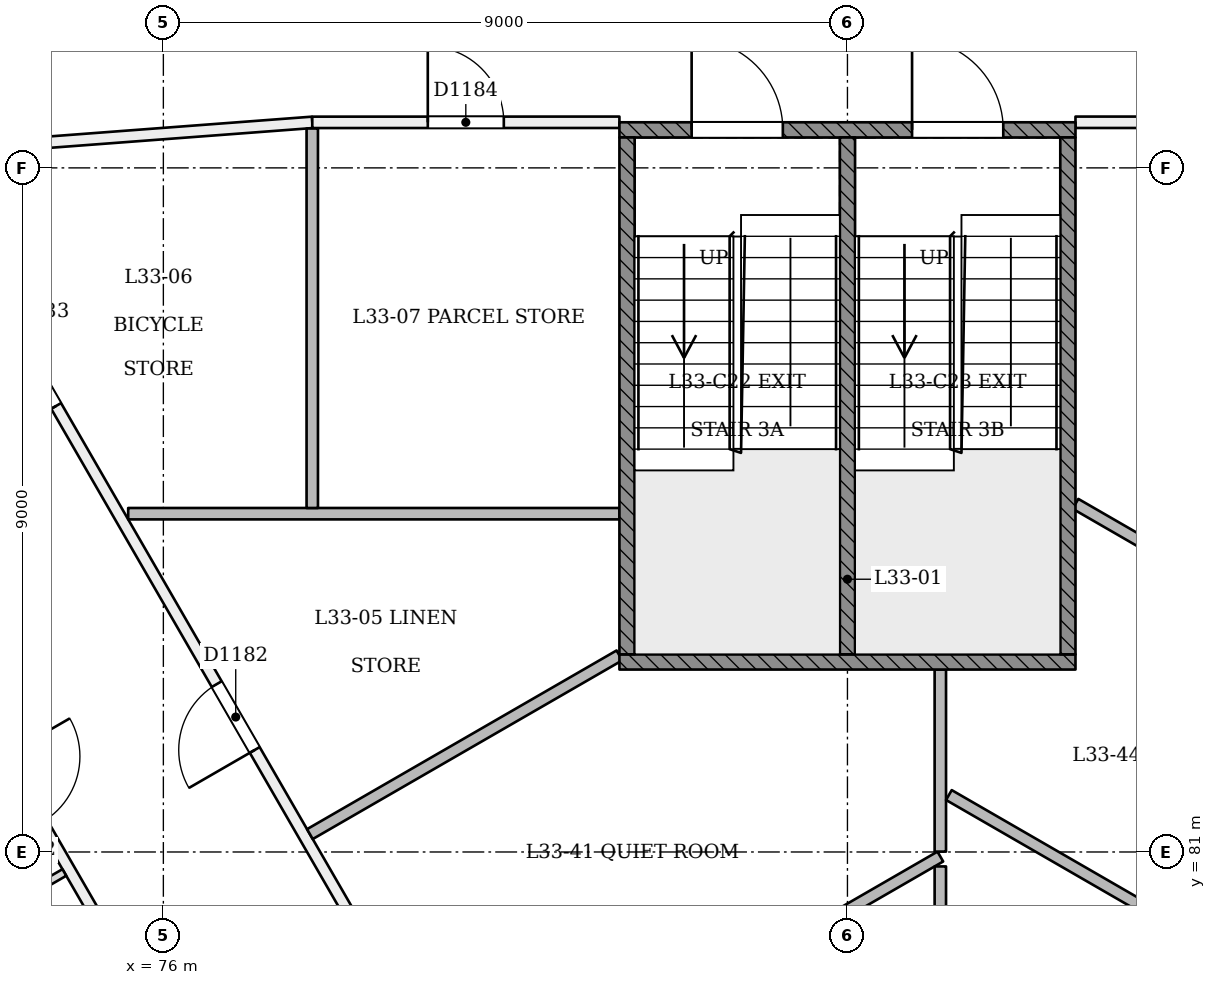
"""IFC4 building model, lengths in metres.
Left out: names, types, materials, properties, quantities, classifications, styles, units other than length and angle.
Written with IfcOpenShell. Run it as: python <this file> out.ifc"""

import sys

from ifc_helpers import new_model, si_unit, direction, frame, frame_2d, origin, place, context, subcontext, project, spatial, rectangle, extrude, element, fill, save


model = new_model("IFC4")
c1 = context("Model", 3, precision=1e-05, world=origin(), true_north=direction((0.0, 1.0)))
c2 = subcontext(c1, "Body", "Model", "MODEL_VIEW")
j1 = project(units=[si_unit("LENGTHUNIT", "METRE"), si_unit("PLANEANGLEUNIT", "RADIAN")], contexts=[c1])
p1 = place(None, origin())
s1 = spatial("IfcSite", under=j1, at=p1, CompositionType="ELEMENT")
p2 = place(p1, origin())
s2 = spatial("IfcBuilding", under=s1, at=p2, CompositionType="ELEMENT")
p3 = place(p2, frame((0.0, 0.0, 131.4)))
s3 = spatial("IfcBuildingStorey", under=s2, at=p3, CompositionType="ELEMENT", Elevation=131.4)
p4 = place(p3, frame((85.0, 68.836, 0.0), z_axis=(0.0, 0.0, 1.0), x_axis=(-0.500001726771, 0.86602440683, 0.0)))
e1 = element("IfcWall", 1, at=p4, inside=s3, PredefinedType="PARTITIONING", context=c2, shape_type="SweptSolid", body=[
    extrude(rectangle(XDim=24.669, YDim=0.15, at=frame_2d((12.335, 0.0))), origin(), (0.0, 0.0, 1.0), 3.15),
])
p5 = place(p4, frame((2.99, 0.0, 0.0)))
e2 = element("IfcOpeningElement", 2, at=p5, cuts=e1, PredefinedType="OPENING", context=c2, shape_type="SweptSolid", body=[
    extrude(rectangle(XDim=1.0, YDim=2.1, at=frame_2d((0.5, 1.05))), frame((0.0, 0.085, 0.0), z_axis=(0.0, -1.0, 0.0), x_axis=(1.0, 0.0, 0.0)), (0.0, 0.0, 1.0), 0.171),
])
p6 = place(p4, frame((15.596, 0.0, 0.0)))
e3 = element("IfcOpeningElement", 3, at=p6, cuts=e1, PredefinedType="OPENING", context=c2, shape_type="SweptSolid", body=[
    extrude(rectangle(XDim=1.0, YDim=2.1, at=frame_2d((0.5, 1.05))), frame((0.0, 0.085, 0.0), z_axis=(0.0, -1.0, 0.0), x_axis=(1.0, 0.0, 0.0)), (0.0, 0.0, 1.0), 0.171),
])
p7 = place(p4, frame((20.822, 0.0, 0.0)))
e4 = element("IfcOpeningElement", 4, at=p7, cuts=e1, PredefinedType="OPENING", context=c2, shape_type="SweptSolid", body=[
    extrude(rectangle(XDim=1.0, YDim=2.1, at=frame_2d((0.5, 1.05))), frame((0.0, 0.085, 0.0), z_axis=(0.0, -1.0, 0.0), x_axis=(1.0, 0.0, 0.0)), (0.0, 0.0, 1.0), 0.171),
])
p8 = place(p4, frame((11.43, 0.0, 0.0)))
e5 = element("IfcOpeningElement", 5, at=p8, cuts=e1, PredefinedType="OPENING", context=c2, shape_type="SweptSolid", body=[
    extrude(rectangle(XDim=1.0, YDim=2.1, at=frame_2d((0.5, 1.05))), frame((0.0, 0.085, 0.0), z_axis=(0.0, -1.0, 0.0), x_axis=(1.0, 0.0, 0.0)), (0.0, 0.0, 1.0), 0.171),
])
p9 = place(p4, frame((7.41, 0.0, 0.0)))
e6 = element("IfcOpeningElement", 6, at=p9, cuts=e1, PredefinedType="OPENING", context=c2, shape_type="SweptSolid", body=[
    extrude(rectangle(XDim=1.0, YDim=2.1, at=frame_2d((0.5, 1.05))), frame((0.0, 0.085, 0.0), z_axis=(0.0, -1.0, 0.0), x_axis=(1.0, 0.0, 0.0)), (0.0, 0.0, 1.0), 0.171),
])
p10 = place(p3, frame((72.784, 90.209, 0.0), z_axis=(0.0, 0.0, 1.0), x_axis=(0.997170112463, 0.075178233616, 0.0)))
e7 = element("IfcWall", 7, at=p10, inside=s3, PredefinedType="PARTITIONING", context=c2, shape_type="SweptSolid", body=[
    extrude(rectangle(XDim=5.189, YDim=0.15, at=frame_2d((2.595, 0.0))), origin(), (0.0, 0.0, 1.0), 3.15),
])
p11 = place(p3, frame((77.959, 90.599, 0.0), z_axis=(0.0, 0.0, 1.0), x_axis=(0.9999999708, 0.000241662632, 0.0)))
e8 = element("IfcWall", 8, at=p11, inside=s3, PredefinedType="PARTITIONING", context=c2, shape_type="SweptSolid", body=[
    extrude(rectangle(XDim=4.041, YDim=0.15, at=frame_2d((2.021, 0.0))), origin(), (0.0, 0.0, 1.0), 3.15),
])
p12 = place(p11, frame((1.52, 0.0, 0.0)))
e9 = element("IfcOpeningElement", 9, at=p12, cuts=e8, PredefinedType="OPENING", context=c2, shape_type="SweptSolid", body=[
    extrude(rectangle(XDim=1.0, YDim=2.1, at=frame_2d((0.5, 1.05))), frame((0.0, 0.085, 0.0), z_axis=(0.0, -1.0, 0.0), x_axis=(1.0, 0.0, 0.0)), (0.0, 0.0, 1.0), 0.171),
])
p13 = place(p3, frame((64.656, 98.273, 0.0), z_axis=(0.0, 0.0, 1.0), x_axis=(0.500001784794, -0.866024373331, 0.0)))
e10 = element("IfcWall", 10, at=p13, inside=s3, PredefinedType="PARTITIONING", context=c2, shape_type="SweptSolid", body=[
    extrude(rectangle(XDim=40.426, YDim=0.15, at=frame_2d((20.213, 0.0))), origin(), (0.0, 0.0, 1.0), 2.75),
])
p14 = place(p13, frame((0.2, 0.0, 0.0)))
e11 = element("IfcOpeningElement", 11, at=p14, cuts=e10, PredefinedType="OPENING", context=c2, shape_type="SweptSolid", body=[
    extrude(rectangle(XDim=1.2, YDim=2.1, at=frame_2d((0.6, 1.05))), frame((0.0, 0.085, 0.0), z_axis=(0.0, -1.0, 0.0), x_axis=(1.0, 0.0, 0.0)), (0.0, 0.0, 1.0), 0.171),
])
p15 = place(p13, frame((2.933, 0.0, 0.0)))
e12 = element("IfcOpeningElement", 12, at=p15, cuts=e10, PredefinedType="OPENING", context=c2, shape_type="SweptSolid", body=[
    extrude(rectangle(XDim=1.0, YDim=2.1, at=frame_2d((0.5, 1.05))), frame((0.0, 0.085, 0.0), z_axis=(0.0, -1.0, 0.0), x_axis=(1.0, 0.0, 0.0)), (0.0, 0.0, 1.0), 0.171),
])
p16 = place(p13, frame((9.608, 0.0, 0.0)))
e13 = element("IfcOpeningElement", 13, at=p16, cuts=e10, PredefinedType="OPENING", context=c2, shape_type="SweptSolid", body=[
    extrude(rectangle(XDim=1.0, YDim=2.1, at=frame_2d((0.5, 1.05))), frame((0.0, 0.085, 0.0), z_axis=(0.0, -1.0, 0.0), x_axis=(1.0, 0.0, 0.0)), (0.0, 0.0, 1.0), 0.171),
])
p17 = place(p13, frame((11.818, 0.0, 0.0)))
e14 = element("IfcOpeningElement", 14, at=p17, cuts=e10, PredefinedType="OPENING", context=c2, shape_type="SweptSolid", body=[
    extrude(rectangle(XDim=1.0, YDim=2.1, at=frame_2d((0.5, 1.05))), frame((0.0, 0.085, 0.0), z_axis=(0.0, -1.0, 0.0), x_axis=(1.0, 0.0, 0.0)), (0.0, 0.0, 1.0), 0.171),
])
p18 = place(p13, frame((18.493, 0.0, 0.0)))
e15 = element("IfcOpeningElement", 15, at=p18, cuts=e10, PredefinedType="OPENING", context=c2, shape_type="SweptSolid", body=[
    extrude(rectangle(XDim=1.0, YDim=2.1, at=frame_2d((0.5, 1.05))), frame((0.0, 0.085, 0.0), z_axis=(0.0, -1.0, 0.0), x_axis=(1.0, 0.0, 0.0)), (0.0, 0.0, 1.0), 0.171),
])
p19 = place(p13, frame((21.963, 0.0, 0.0)))
e16 = element("IfcOpeningElement", 16, at=p19, cuts=e10, PredefinedType="OPENING", context=c2, shape_type="SweptSolid", body=[
    extrude(rectangle(XDim=1.0, YDim=2.1, at=frame_2d((0.5, 1.05))), frame((0.0, 0.085, 0.0), z_axis=(0.0, -1.0, 0.0), x_axis=(1.0, 0.0, 0.0)), (0.0, 0.0, 1.0), 0.171),
])
p20 = place(p13, frame((27.493, 0.0, 0.0)))
e17 = element("IfcOpeningElement", 17, at=p20, cuts=e10, PredefinedType="OPENING", context=c2, shape_type="SweptSolid", body=[
    extrude(rectangle(XDim=1.0, YDim=2.1, at=frame_2d((0.5, 1.05))), frame((0.0, 0.085, 0.0), z_axis=(0.0, -1.0, 0.0), x_axis=(1.0, 0.0, 0.0)), (0.0, 0.0, 1.0), 0.171),
])
p21 = place(p13, frame((30.963, 0.0, 0.0)))
e18 = element("IfcOpeningElement", 18, at=p21, cuts=e10, PredefinedType="OPENING", context=c2, shape_type="SweptSolid", body=[
    extrude(rectangle(XDim=1.0, YDim=2.1, at=frame_2d((0.5, 1.05))), frame((0.0, 0.085, 0.0), z_axis=(0.0, -1.0, 0.0), x_axis=(1.0, 0.0, 0.0)), (0.0, 0.0, 1.0), 0.171),
])
p22 = place(p13, frame((36.493, 0.0, 0.0)))
e19 = element("IfcOpeningElement", 19, at=p22, cuts=e10, PredefinedType="OPENING", context=c2, shape_type="SweptSolid", body=[
    extrude(rectangle(XDim=1.0, YDim=2.1, at=frame_2d((0.5, 1.05))), frame((0.0, 0.085, 0.0), z_axis=(0.0, -1.0, 0.0), x_axis=(1.0, 0.0, 0.0)), (0.0, 0.0, 1.0), 0.171),
])
p23 = place(p13, frame((39.101, 0.0, 0.0)))
e20 = element("IfcOpeningElement", 20, at=p23, cuts=e10, PredefinedType="OPENING", context=c2, shape_type="SweptSolid", body=[
    extrude(rectangle(XDim=1.0, YDim=2.1, at=frame_2d((0.5, 1.05))), frame((0.0, 0.085, 0.0), z_axis=(0.0, -1.0, 0.0), x_axis=(1.0, 0.0, 0.0)), (0.0, 0.0, 1.0), 0.171),
])
p24 = place(p3, frame((85.131, 63.263, 0.0), z_axis=(0.0, 0.0, 1.0), x_axis=(0.500002881847, 0.866023739943, 0.0)))
e21 = element("IfcWall", 21, at=p24, inside=s3, PredefinedType="PARTITIONING", context=c2, shape_type="SweptSolid", body=[
    extrude(rectangle(XDim=34.013, YDim=0.15, at=frame_2d((17.006, 0.0))), origin(), (0.0, 0.0, 1.0), 2.75),
])
p25 = place(p24, frame((0.351, 0.0, 0.0)))
e22 = element("IfcOpeningElement", 22, at=p25, cuts=e21, PredefinedType="OPENING", context=c2, shape_type="SweptSolid", body=[
    extrude(rectangle(XDim=1.2, YDim=2.1, at=frame_2d((0.6, 1.05))), frame((0.0, 0.085, 0.0), z_axis=(0.0, -1.0, 0.0), x_axis=(1.0, 0.0, 0.0)), (0.0, 0.0, 1.0), 0.171),
])
p26 = place(p24, frame((3.963, 0.0, 0.0)))
e23 = element("IfcOpeningElement", 23, at=p26, cuts=e21, PredefinedType="OPENING", context=c2, shape_type="SweptSolid", body=[
    extrude(rectangle(XDim=1.0, YDim=2.1, at=frame_2d((0.5, 1.05))), frame((0.0, 0.085, 0.0), z_axis=(0.0, -1.0, 0.0), x_axis=(1.0, 0.0, 0.0)), (0.0, 0.0, 1.0), 0.171),
])
p27 = place(p24, frame((9.493, 0.0, 0.0)))
e24 = element("IfcOpeningElement", 24, at=p27, cuts=e21, PredefinedType="OPENING", context=c2, shape_type="SweptSolid", body=[
    extrude(rectangle(XDim=1.0, YDim=2.1, at=frame_2d((0.5, 1.05))), frame((0.0, 0.085, 0.0), z_axis=(0.0, -1.0, 0.0), x_axis=(1.0, 0.0, 0.0)), (0.0, 0.0, 1.0), 0.171),
])
p28 = place(p24, frame((11.818, 0.0, 0.0)))
e25 = element("IfcOpeningElement", 25, at=p28, cuts=e21, PredefinedType="OPENING", context=c2, shape_type="SweptSolid", body=[
    extrude(rectangle(XDim=1.0, YDim=2.1, at=frame_2d((0.5, 1.05))), frame((0.0, 0.085, 0.0), z_axis=(0.0, -1.0, 0.0), x_axis=(1.0, 0.0, 0.0)), (0.0, 0.0, 1.0), 0.171),
])
p29 = place(p24, frame((18.608, 0.0, 0.0)))
e26 = element("IfcOpeningElement", 26, at=p29, cuts=e21, PredefinedType="OPENING", context=c2, shape_type="SweptSolid", body=[
    extrude(rectangle(XDim=1.0, YDim=2.1, at=frame_2d((0.5, 1.05))), frame((0.0, 0.085, 0.0), z_axis=(0.0, -1.0, 0.0), x_axis=(1.0, 0.0, 0.0)), (0.0, 0.0, 1.0), 0.171),
])
p30 = place(p24, frame((20.933, 0.0, 0.0)))
e27 = element("IfcOpeningElement", 27, at=p30, cuts=e21, PredefinedType="OPENING", context=c2, shape_type="SweptSolid", body=[
    extrude(rectangle(XDim=1.0, YDim=2.1, at=frame_2d((0.5, 1.05))), frame((0.0, 0.085, 0.0), z_axis=(0.0, -1.0, 0.0), x_axis=(1.0, 0.0, 0.0)), (0.0, 0.0, 1.0), 0.171),
])
p31 = place(p24, frame((27.493, 0.0, 0.0)))
e28 = element("IfcOpeningElement", 28, at=p31, cuts=e21, PredefinedType="OPENING", context=c2, shape_type="SweptSolid", body=[
    extrude(rectangle(XDim=1.0, YDim=2.1, at=frame_2d((0.5, 1.05))), frame((0.0, 0.085, 0.0), z_axis=(0.0, -1.0, 0.0), x_axis=(1.0, 0.0, 0.0)), (0.0, 0.0, 1.0), 0.171),
])
p32 = place(p24, frame((29.933, 0.0, 0.0)))
e29 = element("IfcOpeningElement", 29, at=p32, cuts=e21, PredefinedType="OPENING", context=c2, shape_type="SweptSolid", body=[
    extrude(rectangle(XDim=1.0, YDim=2.1, at=frame_2d((0.5, 1.05))), frame((0.0, 0.085, 0.0), z_axis=(0.0, -1.0, 0.0), x_axis=(1.0, 0.0, 0.0)), (0.0, 0.0, 1.0), 0.171),
])
p33 = place(p3, frame((97.335, 90.2, 0.0), z_axis=(0.0, 0.0, 1.0), x_axis=(-0.500002918398, -0.86602371884, 0.0)))
e30 = element("IfcWall", 30, at=p33, inside=s3, PredefinedType="PARTITIONING", context=c2, shape_type="SweptSolid", body=[
    extrude(rectangle(XDim=24.539, YDim=0.15, at=frame_2d((12.27, 0.0))), origin(), (0.0, 0.0, 1.0), 3.15),
])
p34 = place(p33, frame((6.442, 0.0, 0.0)))
e31 = element("IfcOpeningElement", 31, at=p34, cuts=e30, PredefinedType="OPENING", context=c2, shape_type="SweptSolid", body=[
    extrude(rectangle(XDim=0.9, YDim=2.1, at=frame_2d((0.45, 1.05))), frame((0.0, 0.085, 0.0), z_axis=(0.0, -1.0, 0.0), x_axis=(1.0, 0.0, 0.0)), (0.0, 0.0, 1.0), 0.171),
])
p35 = place(p33, frame((2.46, 0.0, 0.0)))
e32 = element("IfcOpeningElement", 32, at=p35, cuts=e30, PredefinedType="OPENING", context=c2, shape_type="SweptSolid", body=[
    extrude(rectangle(XDim=0.9, YDim=2.1, at=frame_2d((0.45, 1.05))), frame((0.0, 0.085, 0.0), z_axis=(0.0, -1.0, 0.0), x_axis=(1.0, 0.0, 0.0)), (0.0, 0.0, 1.0), 0.171),
])
p36 = place(p33, frame((15.454, 0.0, 0.0)))
e33 = element("IfcOpeningElement", 33, at=p36, cuts=e30, PredefinedType="OPENING", context=c2, shape_type="SweptSolid", body=[
    extrude(rectangle(XDim=1.0, YDim=2.1, at=frame_2d((0.5, 1.05))), frame((0.0, 0.085, 0.0), z_axis=(0.0, -1.0, 0.0), x_axis=(1.0, 0.0, 0.0)), (0.0, 0.0, 1.0), 0.171),
])
p37 = place(p33, frame((10.281, 0.0, 0.0)))
e34 = element("IfcOpeningElement", 34, at=p37, cuts=e30, PredefinedType="OPENING", context=c2, shape_type="SweptSolid", body=[
    extrude(rectangle(XDim=1.0, YDim=2.1, at=frame_2d((0.5, 1.05))), frame((0.0, 0.085, 0.0), z_axis=(0.0, -1.0, 0.0), x_axis=(1.0, 0.0, 0.0)), (0.0, 0.0, 1.0), 0.171),
])
p38 = place(p3, frame((88.0, 90.6, 0.0), z_axis=(0.0, 0.0, 1.0), x_axis=(0.999999983836, -0.000179799521, 0.0)))
e35 = element("IfcWall", 35, at=p38, inside=s3, PredefinedType="PARTITIONING", context=c2, shape_type="SweptSolid", body=[
    extrude(rectangle(XDim=5.431, YDim=0.15, at=frame_2d((2.716, 0.0))), origin(), (0.0, 0.0, 1.0), 3.15),
])
p39 = place(p38, frame((1.603, 0.0, 0.0)))
e36 = element("IfcOpeningElement", 36, at=p39, cuts=e35, PredefinedType="OPENING", context=c2, shape_type="SweptSolid", body=[
    extrude(rectangle(XDim=1.0, YDim=2.1, at=frame_2d((0.5, 1.05))), frame((0.0, 0.085, 0.0), z_axis=(0.0, -1.0, 0.0), x_axis=(1.0, 0.0, 0.0)), (0.0, 0.0, 1.0), 0.171),
])
p40 = place(p3, frame((82.0, 85.451, 0.0), z_axis=(0.0, 0.0, 1.0), x_axis=(-1.0, 0.0, 0.0)))
e37 = element("IfcWall", 37, at=p40, inside=s3, PredefinedType="PARTITIONING", context=c2, shape_type="SweptSolid", body=[
    extrude(rectangle(XDim=6.463, YDim=0.15, at=frame_2d((3.231, 0.0))), origin(), (0.0, 0.0, 1.0), 3.15),
])
p41 = place(p3, frame((77.928, 81.235, 0.0), z_axis=(0.0, 0.0, 1.0), x_axis=(0.866029956157, 0.499992114976, 0.0)))
e38 = element("IfcWall", 38, at=p41, inside=s3, PredefinedType="PARTITIONING", context=c2, shape_type="SweptSolid", body=[
    extrude(rectangle(XDim=4.702, YDim=0.15, at=frame_2d((2.351, 0.0))), origin(), (0.0, 0.0, 1.0), 3.15),
])
p42 = place(p3, frame((77.959, 85.526, 0.0), z_axis=(0.0, 0.0, 1.0), x_axis=(0.0, 1.0, 0.0)))
e39 = element("IfcWall", 39, at=p42, inside=s3, PredefinedType="PARTITIONING", context=c2, shape_type="SweptSolid", body=[
    extrude(rectangle(XDim=4.992, YDim=0.15, at=frame_2d((2.496, 0.0))), origin(), (0.0, 0.0, 1.0), 3.15),
])
p43 = place(p3, frame((69.202, 77.558, 0.0), z_axis=(0.0, 0.0, 1.0), x_axis=(0.866025401434, 0.500000004071, 0.0)))
e40 = element("IfcWall", 40, at=p43, inside=s3, PredefinedType="PARTITIONING", context=c2, shape_type="SweptSolid", body=[
    extrude(rectangle(XDim=6.345, YDim=0.1, at=frame_2d((3.173, 0.0))), origin(), (0.0, 0.0, 1.0), 2.65),
])
p44 = place(p3, frame((80.129, 77.422, 0.0), z_axis=(0.0, 0.0, 1.0), x_axis=(0.866030712881, 0.499990804263, 0.0)))
e41 = element("IfcWall", 41, at=p44, inside=s3, PredefinedType="PARTITIONING", context=c2, shape_type="SweptSolid", body=[
    extrude(rectangle(XDim=7.035, YDim=0.15, at=frame_2d((3.518, 0.0))), origin(), (0.0, 0.0, 1.0), 3.15),
])
p45 = place(p3, frame((86.222, 81.005, 0.0), z_axis=(0.0, 0.0, 1.0), x_axis=(0.0, 1.0, 0.0)))
e42 = element("IfcWall", 42, at=p45, inside=s3, PredefinedType="PARTITIONING", context=c2, shape_type="SweptSolid", body=[
    extrude(rectangle(XDim=2.395, YDim=0.15, at=frame_2d((1.198, 0.0))), origin(), (0.0, 0.0, 1.0), 3.15),
])
p46 = place(p3, frame((86.222, 80.81, 0.0), z_axis=(0.0, 0.0, 1.0), x_axis=(0.0, -1.0, 0.0)))
e43 = element("IfcWall", 43, at=p46, inside=s3, PredefinedType="PARTITIONING", context=c2, shape_type="SweptSolid", body=[
    extrude(rectangle(XDim=4.734, YDim=0.15, at=frame_2d((2.367, 0.0))), origin(), (0.0, 0.0, 1.0), 3.15),
])
p47 = place(p3, frame((90.86, 79.136, 0.0), z_axis=(0.0, 0.0, 1.0), x_axis=(-0.866023771128, 0.500002827834, 0.0)))
e44 = element("IfcWall", 44, at=p47, inside=s3, PredefinedType="PARTITIONING", context=c2, shape_type="SweptSolid", body=[
    extrude(rectangle(XDim=5.226, YDim=0.15, at=frame_2d((2.613, 0.0))), origin(), (0.0, 0.0, 1.0), 3.15),
])
p48 = place(p3, frame((90.073, 84.383, 0.0), z_axis=(0.0, 0.0, 1.0), x_axis=(-0.866044647487, 0.499966667447, 0.0)))
e45 = element("IfcWall", 45, at=p48, inside=s3, PredefinedType="PARTITIONING", context=c2, shape_type="SweptSolid", body=[
    extrude(rectangle(XDim=2.394, YDim=0.15, at=frame_2d((1.197, 0.0))), origin(), (0.0, 0.0, 1.0), 3.15),
])
p49 = place(p3, frame((82.0, 90.5, 0.0), z_axis=(0.0, 0.0, 1.0), x_axis=(1.0, 0.0, 0.0)))
e46 = element("IfcWall", 46, at=p49, inside=s3, PredefinedType="SOLIDWALL", context=c2, shape_type="SweptSolid", body=[
    extrude(rectangle(XDim=6.0, YDim=0.2, at=frame_2d((3.0, 0.0))), origin(), (0.0, 0.0, 1.0), 3.15),
])
p50 = place(p49, frame((0.95, 0.0, 0.0)))
e47 = element("IfcOpeningElement", 47, at=p50, cuts=e46, PredefinedType="OPENING", context=c2, shape_type="SweptSolid", body=[
    extrude(rectangle(XDim=1.2, YDim=2.1, at=frame_2d((0.6, 1.05))), frame((0.0, 0.11, 0.0), z_axis=(0.0, -1.0, 0.0), x_axis=(1.0, 0.0, 0.0)), (0.0, 0.0, 1.0), 0.221),
])
p51 = place(p49, frame((3.85, 0.0, 0.0)))
e48 = element("IfcOpeningElement", 48, at=p51, cuts=e46, PredefinedType="OPENING", context=c2, shape_type="SweptSolid", body=[
    extrude(rectangle(XDim=1.2, YDim=2.1, at=frame_2d((0.6, 1.05))), frame((0.0, 0.11, 0.0), z_axis=(0.0, -1.0, 0.0), x_axis=(1.0, 0.0, 0.0)), (0.0, 0.0, 1.0), 0.221),
])
p52 = place(p3, frame((82.0, 83.5, 0.0), z_axis=(0.0, 0.0, 1.0), x_axis=(1.0, 0.0, 0.0)))
e49 = element("IfcWall", 49, at=p52, inside=s3, PredefinedType="SOLIDWALL", context=c2, shape_type="SweptSolid", body=[
    extrude(rectangle(XDim=6.0, YDim=0.2, at=frame_2d((3.0, 0.0))), origin(), (0.0, 0.0, 1.0), 3.15),
])
for number, where, z_axis, x_axis in (
    (50, (82.1, 83.6, 0.0), (0.0, 0.0, 1.0), (0.0, 1.0, 0.0)),
    (51, (87.9, 83.6, 0.0), (0.0, 0.0, 1.0), (0.0, 1.0, 0.0)),
    (52, (85.0, 83.6, 0.0), (0.0, 0.0, 1.0), (0.0, 1.0, 0.0)),
):
    element("IfcWall", number, at=place(p3, frame(where, z_axis=z_axis, x_axis=x_axis)), inside=s3, PredefinedType="SOLIDWALL", context=c2, shape_type="SweptSolid", body=[
        extrude(rectangle(XDim=6.8, YDim=0.2, at=frame_2d((3.4, 0.0))), origin(), (0.0, 0.0, 1.0), 3.15),
    ])
p53 = place(p6, origin())
e53 = element("IfcDoor", 53, at=p53, inside=s3, OperationType="SINGLE_SWING_LEFT", PredefinedType="NOTDEFINED", context=c2, shape_type="SweptSolid", body=[
    extrude(rectangle(XDim=1.0, YDim=2.1, at=frame_2d((0.5, 1.05))), frame((0.0, 0.025, 0.0), z_axis=(0.0, -1.0, 0.0), x_axis=(1.0, 0.0, 0.0)), (0.0, 0.0, 1.0), 0.05),
])
fill(e3, e53)
p54 = place(p7, origin())
e54 = element("IfcDoor", 54, at=p54, inside=s3, OperationType="SINGLE_SWING_LEFT", PredefinedType="NOTDEFINED", context=c2, shape_type="SweptSolid", body=[
    extrude(rectangle(XDim=1.0, YDim=2.1, at=frame_2d((0.5, 1.05))), frame((0.0, 0.025, 0.0), z_axis=(0.0, -1.0, 0.0), x_axis=(1.0, 0.0, 0.0)), (0.0, 0.0, 1.0), 0.05),
])
fill(e4, e54)
p55 = place(p12, origin())
e55 = element("IfcDoor", 55, at=p55, inside=s3, OperationType="SINGLE_SWING_LEFT", PredefinedType="NOTDEFINED", context=c2, shape_type="SweptSolid", body=[
    extrude(rectangle(XDim=1.0, YDim=2.1, at=frame_2d((0.5, 1.05))), frame((0.0, 0.025, 0.0), z_axis=(0.0, -1.0, 0.0), x_axis=(1.0, 0.0, 0.0)), (0.0, 0.0, 1.0), 0.05),
])
fill(e9, e55)
p56 = place(p50, origin())
e56 = element("IfcDoor", 56, at=p56, inside=s3, OperationType="SINGLE_SWING_LEFT", PredefinedType="NOTDEFINED", context=c2, shape_type="SweptSolid", body=[
    extrude(rectangle(XDim=1.2, YDim=2.1, at=frame_2d((0.6, 1.05))), frame((0.0, 0.025, 0.0), z_axis=(0.0, -1.0, 0.0), x_axis=(1.0, 0.0, 0.0)), (0.0, 0.0, 1.0), 0.05),
])
fill(e47, e56)
p57 = place(p51, origin())
e57 = element("IfcDoor", 57, at=p57, inside=s3, OperationType="SINGLE_SWING_LEFT", PredefinedType="NOTDEFINED", context=c2, shape_type="SweptSolid", body=[
    extrude(rectangle(XDim=1.2, YDim=2.1, at=frame_2d((0.6, 1.05))), frame((0.0, 0.025, 0.0), z_axis=(0.0, -1.0, 0.0), x_axis=(1.0, 0.0, 0.0)), (0.0, 0.0, 1.0), 0.05),
])
fill(e48, e57)
save(model, sys.argv[1])
